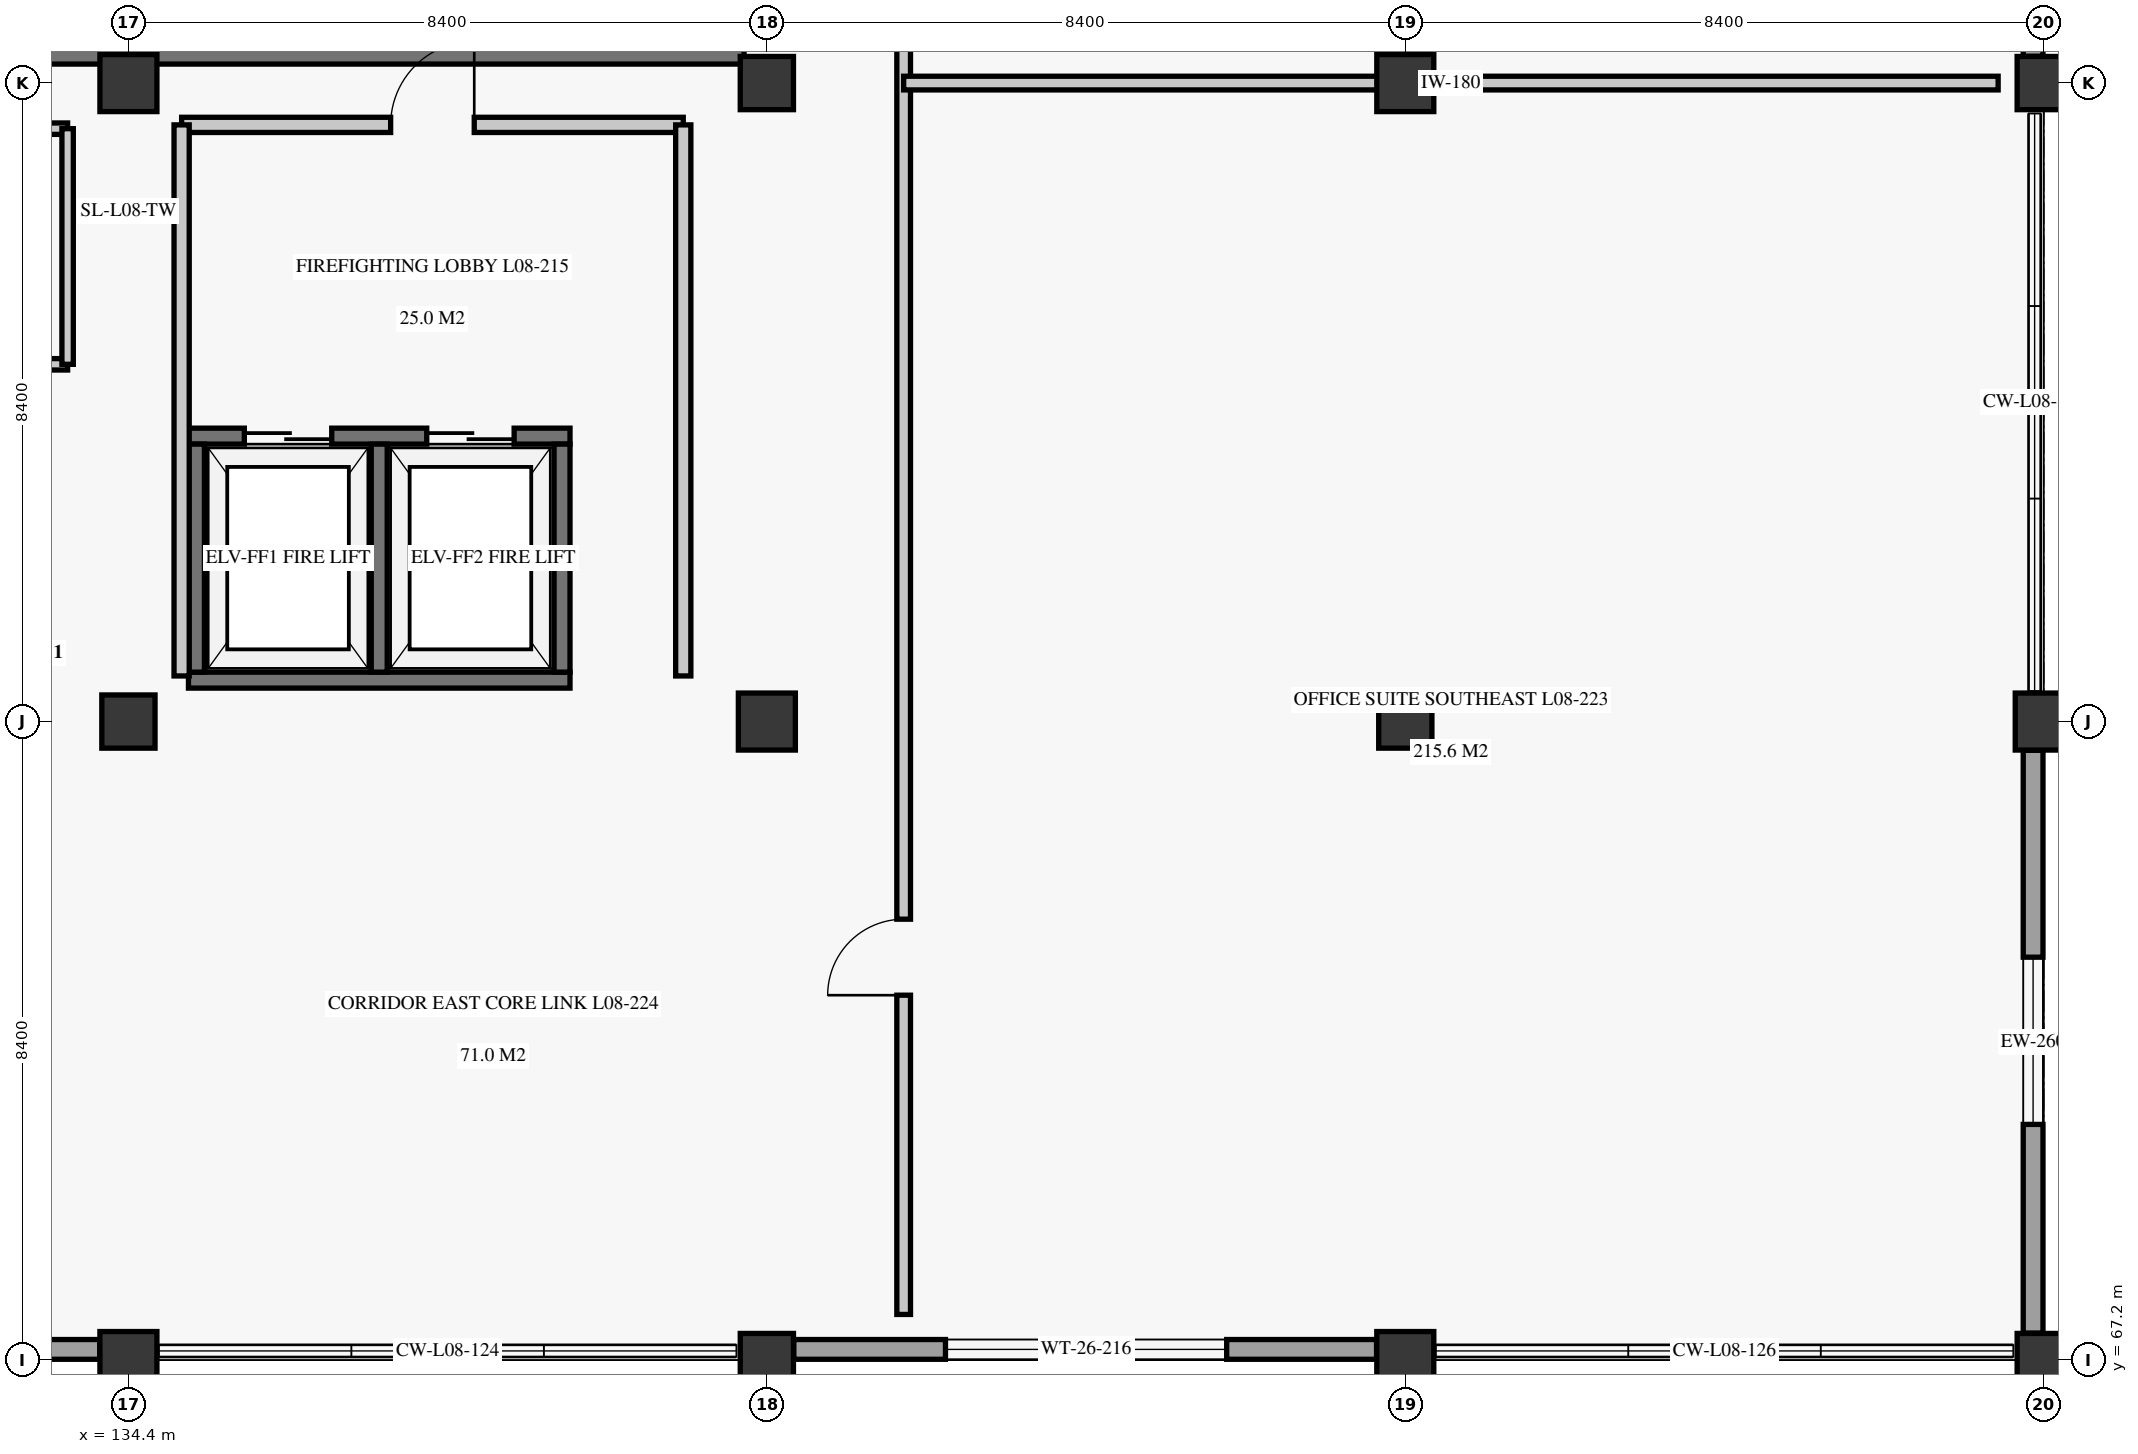
"""IFC4 building model, lengths in metres.
Left out: names, types, materials, properties, quantities, classifications, styles, units other than length and angle.
Written with IfcOpenShell. Run it as: python <this file> out.ifc"""

import sys

from ifc_helpers import new_model, si_unit, direction, frame, frame_2d, origin, origin_2d, place, context, subcontext, project, spatial, rectangle, extrude, element, fill, save


model = new_model("IFC4")
c1 = context("Model", 3, precision=1e-05, world=origin(), true_north=direction((0.0, 1.0)))
c2 = subcontext(c1, "Body", "Model", "MODEL_VIEW")
j1 = project(units=[si_unit("LENGTHUNIT", "METRE"), si_unit("PLANEANGLEUNIT", "RADIAN")], contexts=[c1])
p1 = place(None, origin())
s1 = spatial("IfcSite", under=j1, at=p1, CompositionType="ELEMENT")
p2 = place(p1, origin())
s2 = spatial("IfcBuilding", under=s1, at=p2, CompositionType="ELEMENT")
p3 = place(p2, frame((0.0, 0.0, 34.7)))
s3 = spatial("IfcBuildingStorey", under=s2, at=p3, CompositionType="ELEMENT", Elevation=34.7)
p4 = place(p3, frame((134.4, 67.2, 0.0), z_axis=(0.0, 0.0, 1.0), x_axis=(1.0, 0.0, 0.0)))
e1 = element("IfcColumn", 1, at=p4, inside=s3, PredefinedType="COLUMN", context=c2, shape_type="SweptSolid", body=[
    extrude(rectangle(XDim=0.75, YDim=0.75, at=origin_2d()), origin(), (0.0, 0.0, 1.0), 3.72),
])
p5 = place(p3, frame((134.4, 75.6, 0.0), z_axis=(0.0, 0.0, 1.0), x_axis=(1.0, 0.0, 0.0)))
e2 = element("IfcColumn", 2, at=p5, inside=s3, PredefinedType="COLUMN", context=c2, shape_type="SweptSolid", body=[
    extrude(rectangle(XDim=0.7, YDim=0.7, at=origin_2d()), origin(), (0.0, 0.0, 1.0), 3.72),
])
p6 = place(p3, frame((134.4, 84.0, 0.0), z_axis=(0.0, 0.0, 1.0), x_axis=(1.0, 0.0, 0.0)))
e3 = element("IfcColumn", 3, at=p6, inside=s3, PredefinedType="COLUMN", context=c2, shape_type="SweptSolid", body=[
    extrude(rectangle(XDim=0.75, YDim=0.75, at=origin_2d()), origin(), (0.0, 0.0, 1.0), 3.72),
])
p7 = place(p3, frame((142.8, 67.2, 0.0), z_axis=(0.0, 0.0, 1.0), x_axis=(1.0, 0.0, 0.0)))
e4 = element("IfcColumn", 4, at=p7, inside=s3, PredefinedType="COLUMN", context=c2, shape_type="SweptSolid", body=[
    extrude(rectangle(XDim=0.7, YDim=0.7, at=origin_2d()), origin(), (0.0, 0.0, 1.0), 3.72),
])
p8 = place(p3, frame((142.8, 75.6, 0.0), z_axis=(0.0, 0.0, 1.0), x_axis=(1.0, 0.0, 0.0)))
e5 = element("IfcColumn", 5, at=p8, inside=s3, PredefinedType="COLUMN", context=c2, shape_type="SweptSolid", body=[
    extrude(rectangle(XDim=0.75, YDim=0.75, at=origin_2d()), origin(), (0.0, 0.0, 1.0), 3.72),
])
p9 = place(p3, frame((142.8, 84.0, 0.0), z_axis=(0.0, 0.0, 1.0), x_axis=(1.0, 0.0, 0.0)))
e6 = element("IfcColumn", 6, at=p9, inside=s3, PredefinedType="COLUMN", context=c2, shape_type="SweptSolid", body=[
    extrude(rectangle(XDim=0.7, YDim=0.7, at=origin_2d()), origin(), (0.0, 0.0, 1.0), 3.72),
])
p10 = place(p3, frame((151.2, 67.2, 0.0), z_axis=(0.0, 0.0, 1.0), x_axis=(1.0, 0.0, 0.0)))
e7 = element("IfcColumn", 7, at=p10, inside=s3, PredefinedType="COLUMN", context=c2, shape_type="SweptSolid", body=[
    extrude(rectangle(XDim=0.75, YDim=0.75, at=origin_2d()), origin(), (0.0, 0.0, 1.0), 3.72),
])
p11 = place(p3, frame((151.2, 75.6, 0.0), z_axis=(0.0, 0.0, 1.0), x_axis=(1.0, 0.0, 0.0)))
e8 = element("IfcColumn", 8, at=p11, inside=s3, PredefinedType="COLUMN", context=c2, shape_type="SweptSolid", body=[
    extrude(rectangle(XDim=0.7, YDim=0.7, at=origin_2d()), origin(), (0.0, 0.0, 1.0), 3.72),
])
p12 = place(p3, frame((151.2, 84.0, 0.0), z_axis=(0.0, 0.0, 1.0), x_axis=(1.0, 0.0, 0.0)))
e9 = element("IfcColumn", 9, at=p12, inside=s3, PredefinedType="COLUMN", context=c2, shape_type="SweptSolid", body=[
    extrude(rectangle(XDim=0.75, YDim=0.75, at=origin_2d()), origin(), (0.0, 0.0, 1.0), 3.72),
])
p13 = place(p3, frame((159.6, 67.2, 0.0), z_axis=(0.0, 0.0, 1.0), x_axis=(1.0, 0.0, 0.0)))
e10 = element("IfcColumn", 10, at=p13, inside=s3, PredefinedType="COLUMN", context=c2, shape_type="SweptSolid", body=[
    extrude(rectangle(XDim=0.7, YDim=0.7, at=origin_2d()), origin(), (0.0, 0.0, 1.0), 3.72),
])
p14 = place(p3, frame((159.6, 75.6, 0.0), z_axis=(0.0, 0.0, 1.0), x_axis=(1.0, 0.0, 0.0)))
e11 = element("IfcColumn", 11, at=p14, inside=s3, PredefinedType="COLUMN", context=c2, shape_type="SweptSolid", body=[
    extrude(rectangle(XDim=0.75, YDim=0.75, at=origin_2d()), origin(), (0.0, 0.0, 1.0), 3.72),
])
p15 = place(p3, frame((159.6, 84.0, 0.0), z_axis=(0.0, 0.0, 1.0), x_axis=(1.0, 0.0, 0.0)))
e12 = element("IfcColumn", 12, at=p15, inside=s3, PredefinedType="COLUMN", context=c2, shape_type="SweptSolid", body=[
    extrude(rectangle(XDim=0.7, YDim=0.7, at=origin_2d()), origin(), (0.0, 0.0, 1.0), 3.72),
])
p16 = place(p3, frame((126.352, 67.34, 0.0), z_axis=(0.0, 0.0, 1.0), x_axis=(1.0, 0.0, 0.0)))
e13 = element("IfcWall", 13, at=p16, inside=s3, PredefinedType="SOLIDWALL", context=c2, shape_type="SweptSolid", body=[
    extrude(rectangle(XDim=7.67, YDim=0.26, at=frame_2d((3.835, 0.0))), origin(), (0.0, 0.0, 1.0), 3.04),
])
p17 = place(p16, frame((2.598, 0.0, 0.85)))
e14 = element("IfcOpeningElement", 14, at=p17, cuts=e13, PredefinedType="OPENING", context=c2, shape_type="SweptSolid", body=[
    extrude(rectangle(XDim=2.5, YDim=1.8, at=frame_2d((1.25, 0.9))), frame((0.0, 0.14, 0.0), z_axis=(0.0, -1.0, 0.0), x_axis=(1.0, 0.0, 0.0)), (0.0, 0.0, 1.0), 0.28),
])
p18 = place(p3, frame((143.154, 67.34, 0.0), z_axis=(0.0, 0.0, 1.0), x_axis=(1.0, 0.0, 0.0)))
e15 = element("IfcWall", 15, at=p18, inside=s3, PredefinedType="SOLIDWALL", context=c2, shape_type="SweptSolid", body=[
    extrude(rectangle(XDim=7.668, YDim=0.26, at=frame_2d((3.834, 0.0))), origin(), (0.0, 0.0, 1.0), 3.04),
])
p19 = place(p18, frame((1.996, 0.0, 0.85)))
e16 = element("IfcOpeningElement", 16, at=p19, cuts=e15, PredefinedType="OPENING", context=c2, shape_type="SweptSolid", body=[
    extrude(rectangle(XDim=3.7, YDim=1.9, at=frame_2d((1.85, 0.95))), frame((0.0, 0.14, 0.0), z_axis=(0.0, -1.0, 0.0), x_axis=(1.0, 0.0, 0.0)), (0.0, 0.0, 1.0), 0.28),
])
p20 = place(p3, frame((159.46, 67.554, 0.0), z_axis=(0.0, 0.0, 1.0), x_axis=(0.0, 1.0, 0.0)))
e17 = element("IfcWall", 17, at=p20, inside=s3, PredefinedType="SOLIDWALL", context=c2, shape_type="SweptSolid", body=[
    extrude(rectangle(XDim=7.668, YDim=0.26, at=frame_2d((3.834, 0.0))), origin(), (0.0, 0.0, 1.0), 3.04),
])
p21 = place(p20, frame((2.746, 0.0, 0.85)))
e18 = element("IfcOpeningElement", 18, at=p21, cuts=e17, PredefinedType="OPENING", context=c2, shape_type="SweptSolid", body=[
    extrude(rectangle(XDim=2.2, YDim=1.8, at=frame_2d((1.1, 0.9))), frame((0.0, 0.14, 0.0), z_axis=(0.0, -1.0, 0.0), x_axis=(1.0, 0.0, 0.0)), (0.0, 0.0, 1.0), 0.28),
])
p22 = place(p3, frame((159.46, 84.352, 0.0), z_axis=(0.0, 0.0, 1.0), x_axis=(0.0, 1.0, 0.0)))
e19 = element("IfcWall", 19, at=p22, inside=s3, PredefinedType="SOLIDWALL", context=c2, shape_type="SweptSolid", body=[
    extrude(rectangle(XDim=7.67, YDim=0.26, at=frame_2d((3.835, 0.0))), origin(), (0.0, 0.0, 1.0), 3.04),
])
p23 = place(p22, frame((3.248, 0.0, 0.85)))
e20 = element("IfcOpeningElement", 20, at=p23, cuts=e19, PredefinedType="OPENING", context=c2, shape_type="SweptSolid", body=[
    extrude(rectangle(XDim=1.2, YDim=1.6, at=frame_2d((0.6, 0.8))), frame((0.0, 0.14, 0.0), z_axis=(0.0, -1.0, 0.0), x_axis=(1.0, 0.0, 0.0)), (0.0, 0.0, 1.0), 0.28),
])
p24 = place(p3, frame((132.75, 84.425, 0.0), z_axis=(0.0, 0.0, 1.0), x_axis=(1.0, 0.0, 0.0)))
e21 = element("IfcWall", 21, at=p24, inside=s3, PredefinedType="SHEAR", context=c2, shape_type="SweptSolid", body=[
    extrude(rectangle(XDim=9.75, YDim=0.35, at=frame_2d((4.875, 0.0))), origin(), (0.0, 0.0, 1.0), 3.72),
])
p25 = place(p3, frame((135.19, 76.145, 0.0), z_axis=(0.0, 0.0, 1.0), x_axis=(1.0, 0.0, 0.0)))
e22 = element("IfcWall", 22, at=p25, inside=s3, PredefinedType="SHEAR", context=c2, shape_type="SweptSolid", body=[
    extrude(rectangle(XDim=5.02, YDim=0.21, at=frame_2d((2.51, 0.0))), origin(), (0.0, 0.0, 1.0), 3.72),
])
p26 = place(p3, frame((135.19, 79.355, 0.0), z_axis=(0.0, 0.0, 1.0), x_axis=(1.0, 0.0, 0.0)))
e23 = element("IfcWall", 23, at=p26, inside=s3, PredefinedType="SHEAR", context=c2, shape_type="SweptSolid", body=[
    extrude(rectangle(XDim=5.02, YDim=0.21, at=frame_2d((2.51, 0.0))), origin(), (0.0, 0.0, 1.0), 3.72),
])
p27 = place(p26, frame((0.735, 0.0, 0.0)))
e24 = element("IfcOpeningElement", 24, at=p27, cuts=e23, PredefinedType="OPENING", context=c2, shape_type="SweptSolid", body=[
    extrude(rectangle(XDim=1.15, YDim=2.2, at=frame_2d((0.575, 1.1))), frame((0.0, 0.115, 0.0), z_axis=(0.0, -1.0, 0.0), x_axis=(1.0, 0.0, 0.0)), (0.0, 0.0, 1.0), 0.23),
])
p28 = place(p26, frame((3.135, 0.0, 0.0)))
e25 = element("IfcOpeningElement", 25, at=p28, cuts=e23, PredefinedType="OPENING", context=c2, shape_type="SweptSolid", body=[
    extrude(rectangle(XDim=1.15, YDim=2.2, at=frame_2d((0.575, 1.1))), frame((0.0, 0.115, 0.0), z_axis=(0.0, -1.0, 0.0), x_axis=(1.0, 0.0, 0.0)), (0.0, 0.0, 1.0), 0.23),
])
for number, where, z_axis, x_axis in (
    (26, (135.295, 76.25, 0.0), (0.0, 0.0, 1.0), (0.0, 1.0, 0.0)),
    (27, (140.105, 76.25, 0.0), (0.0, 0.0, 1.0), (0.0, 1.0, 0.0)),
    (28, (137.7, 76.25, 0.0), (0.0, 0.0, 1.0), (0.0, 1.0, 0.0)),
):
    element("IfcWall", number, at=place(p3, frame(where, z_axis=z_axis, x_axis=x_axis)), inside=s3, PredefinedType="SHEAR", context=c2, shape_type="SweptSolid", body=[
        extrude(rectangle(XDim=3.0, YDim=0.21, at=frame_2d((1.5, 0.0))), origin(), (0.0, 0.0, 1.0), 3.72),
    ])
p29 = place(p3, frame((135.1, 83.45, 0.0), z_axis=(0.0, 0.0, 1.0), x_axis=(1.0, 0.0, 0.0)))
e29 = element("IfcWall", 29, at=p29, inside=s3, PredefinedType="PARTITIONING", context=c2, shape_type="SweptSolid", body=[
    extrude(rectangle(XDim=6.6, YDim=0.2, at=frame_2d((3.3, 0.0))), origin(), (0.0, 0.0, 1.0), 3.34),
])
p30 = place(p29, frame((2.75, 0.0, 0.0)))
e30 = element("IfcOpeningElement", 30, at=p30, cuts=e29, PredefinedType="OPENING", context=c2, shape_type="SweptSolid", body=[
    extrude(rectangle(XDim=1.1, YDim=2.2, at=frame_2d((0.55, 1.1))), frame((0.0, 0.11, 0.0), z_axis=(0.0, -1.0, 0.0), x_axis=(1.0, 0.0, 0.0)), (0.0, 0.0, 1.0), 0.22),
])
for number, where, z_axis, x_axis in (
    (31, (135.1, 76.2, 0.0), (0.0, 0.0, 1.0), (0.0, 1.0, 0.0)),
    (32, (141.7, 76.2, 0.0), (0.0, 0.0, 1.0), (0.0, 1.0, 0.0)),
):
    element("IfcWall", number, at=place(p3, frame(where, z_axis=z_axis, x_axis=x_axis)), inside=s3, PredefinedType="PARTITIONING", context=c2, shape_type="SweptSolid", body=[
        extrude(rectangle(XDim=7.25, YDim=0.2, at=frame_2d((3.625, 0.0))), origin(), (0.0, 0.0, 1.0), 3.34),
    ])
p31 = place(p3, frame((129.1, 80.3, 0.0), z_axis=(0.0, 0.0, 1.0), x_axis=(1.0, 0.0, 0.0)))
e33 = element("IfcWall", 33, at=p31, inside=s3, PredefinedType="PARTITIONING", context=c2, shape_type="SweptSolid", body=[
    extrude(rectangle(XDim=4.5, YDim=0.15, at=frame_2d((2.25, 0.0))), origin(), (0.0, 0.0, 1.0), 3.34),
])
p32 = place(p31, frame((1.65, 0.0, 0.0)))
e34 = element("IfcOpeningElement", 34, at=p32, cuts=e33, PredefinedType="OPENING", context=c2, shape_type="SweptSolid", body=[
    extrude(rectangle(XDim=1.0, YDim=2.1, at=frame_2d((0.5, 1.05))), frame((0.0, 0.085, 0.0), z_axis=(0.0, -1.0, 0.0), x_axis=(1.0, 0.0, 0.0)), (0.0, 0.0, 1.0), 0.17),
])
p33 = place(p3, frame((129.1, 83.4, 0.0), z_axis=(0.0, 0.0, 1.0), x_axis=(1.0, 0.0, 0.0)))
e35 = element("IfcWall", 35, at=p33, inside=s3, PredefinedType="PARTITIONING", context=c2, shape_type="SweptSolid", body=[
    extrude(rectangle(XDim=4.5, YDim=0.15, at=frame_2d((2.25, 0.0))), origin(), (0.0, 0.0, 1.0), 3.34),
])
p34 = place(p3, frame((133.6, 80.3, 0.0), z_axis=(0.0, 0.0, 1.0), x_axis=(0.0, 1.0, 0.0)))
e36 = element("IfcWall", 36, at=p34, inside=s3, PredefinedType="PARTITIONING", context=c2, shape_type="SweptSolid", body=[
    extrude(rectangle(XDim=3.1, YDim=0.15, at=frame_2d((1.55, 0.0))), origin(), (0.0, 0.0, 1.0), 3.34),
])
p35 = place(p3, frame((144.6, 67.8, 0.0), z_axis=(0.0, 0.0, 1.0), x_axis=(0.0, 1.0, 0.0)))
e37 = element("IfcWall", 37, at=p35, inside=s3, PredefinedType="PARTITIONING", context=c2, shape_type="SweptSolid", body=[
    extrude(rectangle(XDim=32.4, YDim=0.18, at=frame_2d((16.2, 0.0))), origin(), (0.0, 0.0, 1.0), 3.34),
])
p36 = place(p35, frame((4.2, 0.0, 0.0)))
e38 = element("IfcOpeningElement", 38, at=p36, cuts=e37, PredefinedType="OPENING", context=c2, shape_type="SweptSolid", body=[
    extrude(rectangle(XDim=1.0, YDim=2.15, at=frame_2d((0.5, 1.075))), frame((0.0, 0.1, 0.0), z_axis=(0.0, -1.0, 0.0), x_axis=(1.0, 0.0, 0.0)), (0.0, 0.0, 1.0), 0.2),
])
p37 = place(p35, frame((21.4, 0.0, 0.0)))
e39 = element("IfcOpeningElement", 39, at=p37, cuts=e37, PredefinedType="OPENING", context=c2, shape_type="SweptSolid", body=[
    extrude(rectangle(XDim=1.0, YDim=2.15, at=frame_2d((0.5, 1.075))), frame((0.0, 0.1, 0.0), z_axis=(0.0, -1.0, 0.0), x_axis=(1.0, 0.0, 0.0)), (0.0, 0.0, 1.0), 0.2),
])
p38 = place(p3, frame((144.6, 84.0, 0.0), z_axis=(0.0, 0.0, 1.0), x_axis=(1.0, 0.0, 0.0)))
e40 = element("IfcWall", 40, at=p38, inside=s3, PredefinedType="PARTITIONING", context=c2, shape_type="SweptSolid", body=[
    extrude(rectangle(XDim=14.4, YDim=0.18, at=frame_2d((7.2, 0.0))), origin(), (0.0, 0.0, 1.0), 3.34),
])
p39 = place(p19, origin())
e41 = element("IfcWindow", 41, at=p39, inside=s3, PartitioningType="SINGLE_PANEL", PredefinedType="WINDOW", context=c2, shape_type="SweptSolid", body=[
    extrude(rectangle(XDim=3.7, YDim=1.9, at=frame_2d((1.85, 0.95))), frame((0.0, 0.03, 0.0), z_axis=(0.0, -1.0, 0.0), x_axis=(1.0, 0.0, 0.0)), (0.0, 0.0, 1.0), 0.06),
])
fill(e16, e41)
p40 = place(p21, origin())
e42 = element("IfcWindow", 42, at=p40, inside=s3, PartitioningType="SINGLE_PANEL", PredefinedType="WINDOW", context=c2, shape_type="SweptSolid", body=[
    extrude(rectangle(XDim=2.2, YDim=1.8, at=frame_2d((1.1, 0.9))), frame((0.0, 0.03, 0.0), z_axis=(0.0, -1.0, 0.0), x_axis=(1.0, 0.0, 0.0)), (0.0, 0.0, 1.0), 0.06),
])
fill(e18, e42)
p41 = place(p27, origin())
e43 = element("IfcDoor", 43, at=p41, inside=s3, OperationType="DOUBLE_DOOR_SLIDING", PredefinedType="DOOR", context=c2, shape_type="SweptSolid", body=[
    extrude(rectangle(XDim=1.15, YDim=2.2, at=frame_2d((0.575, 1.1))), frame((0.0, 0.025, 0.0), z_axis=(0.0, -1.0, 0.0), x_axis=(1.0, 0.0, 0.0)), (0.0, 0.0, 1.0), 0.05),
])
fill(e24, e43)
p42 = place(p28, origin())
e44 = element("IfcDoor", 44, at=p42, inside=s3, OperationType="DOUBLE_DOOR_SLIDING", PredefinedType="DOOR", context=c2, shape_type="SweptSolid", body=[
    extrude(rectangle(XDim=1.15, YDim=2.2, at=frame_2d((0.575, 1.1))), frame((0.0, 0.025, 0.0), z_axis=(0.0, -1.0, 0.0), x_axis=(1.0, 0.0, 0.0)), (0.0, 0.0, 1.0), 0.05),
])
fill(e25, e44)
p43 = place(p30, origin())
e45 = element("IfcDoor", 45, at=p43, inside=s3, OperationType="SINGLE_SWING_RIGHT", PredefinedType="DOOR", context=c2, shape_type="SweptSolid", body=[
    extrude(rectangle(XDim=1.1, YDim=2.2, at=frame_2d((0.55, 1.1))), frame((0.0, 0.025, 0.0), z_axis=(0.0, -1.0, 0.0), x_axis=(1.0, 0.0, 0.0)), (0.0, 0.0, 1.0), 0.05),
])
fill(e30, e45)
p44 = place(p36, origin())
e46 = element("IfcDoor", 46, at=p44, inside=s3, OperationType="SINGLE_SWING_LEFT", PredefinedType="DOOR", context=c2, shape_type="SweptSolid", body=[
    extrude(rectangle(XDim=1.0, YDim=2.15, at=frame_2d((0.5, 1.075))), frame((0.0, 0.025, 0.0), z_axis=(0.0, -1.0, 0.0), x_axis=(1.0, 0.0, 0.0)), (0.0, 0.0, 1.0), 0.05),
])
fill(e38, e46)
save(model, sys.argv[1])
